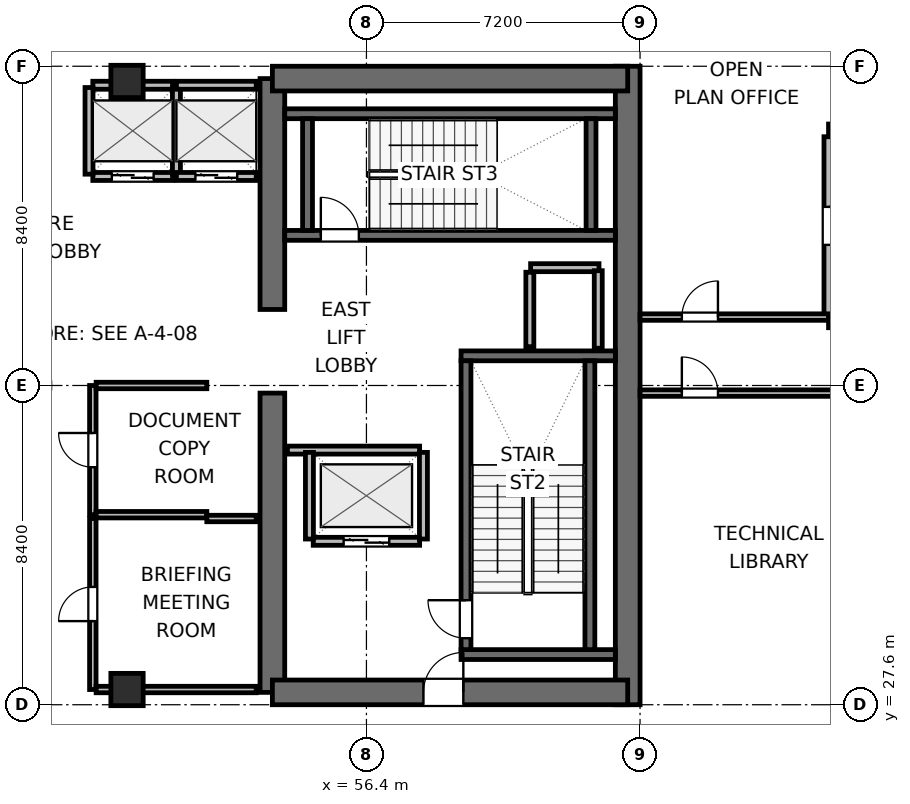
"""IFC4 building model, lengths in metres.
Left out: names, types, materials, properties, quantities, classifications, styles, units other than length and angle.
Written with IfcOpenShell. Run it as: python <this file> out.ifc"""

import sys

from ifc_helpers import new_model, si_unit, direction, frame, frame_2d, origin, origin_2d, place, context, subcontext, project, spatial, rectangle, extrude, element, fill, save


model = new_model("IFC4")
c1 = context("Model", 3, precision=1e-05, world=origin(), true_north=direction((0.0, 1.0)))
c2 = subcontext(c1, "Body", "Model", "MODEL_VIEW")
j1 = project(units=[si_unit("LENGTHUNIT", "METRE"), si_unit("PLANEANGLEUNIT", "RADIAN")], contexts=[c1])
p1 = place(None, origin())
s1 = spatial("IfcSite", under=j1, at=p1, CompositionType="ELEMENT")
p2 = place(p1, origin())
s2 = spatial("IfcBuilding", under=s1, at=p2, CompositionType="ELEMENT")
p3 = place(p2, frame((0.0, 0.0, 181.8)))
s3 = spatial("IfcBuildingStorey", under=s2, at=p3, CompositionType="ELEMENT", Elevation=181.8)
p4 = place(p3, frame((53.925, 27.925, 0.0), z_axis=(0.0, 0.0, 1.0), x_axis=(0.0, 1.0, 0.0)))
e1 = element("IfcWall", 1, at=p4, inside=s3, PredefinedType="SHEAR", context=c2, shape_type="SweptSolid", body=[
    extrude(rectangle(XDim=7.875, YDim=0.65, at=frame_2d((3.938, 0.0))), origin(), (0.0, 0.0, 1.0), 4.5),
])
p5 = place(p3, frame((53.925, 38.0, 0.0), z_axis=(0.0, 0.0, 1.0), x_axis=(0.0, 1.0, 0.0)))
e2 = element("IfcWall", 2, at=p5, inside=s3, PredefinedType="SHEAR", context=c2, shape_type="SweptSolid", body=[
    extrude(rectangle(XDim=6.075, YDim=0.65, at=frame_2d((3.038, 0.0))), origin(), (0.0, 0.0, 1.0), 4.5),
])
p6 = place(p3, frame((63.275, 27.6, 0.0), z_axis=(0.0, 0.0, 1.0), x_axis=(0.0, 1.0, 0.0)))
e3 = element("IfcWall", 3, at=p6, inside=s3, PredefinedType="SHEAR", context=c2, shape_type="SweptSolid", body=[
    extrude(rectangle(XDim=16.8, YDim=0.65, at=frame_2d((8.4, 0.0))), origin(), (0.0, 0.0, 1.0), 4.5),
])
p7 = place(p3, frame((53.925, 27.925, 0.0), z_axis=(0.0, 0.0, 1.0), x_axis=(1.0, 0.0, 0.0)))
e4 = element("IfcWall", 4, at=p7, inside=s3, PredefinedType="SHEAR", context=c2, shape_type="SweptSolid", body=[
    extrude(rectangle(XDim=9.35, YDim=0.65, at=frame_2d((4.675, 0.0))), origin(), (0.0, 0.0, 1.0), 4.5),
])
p8 = place(p7, frame((3.975, 0.0, 0.0)))
e5 = element("IfcOpeningElement", 5, at=p8, cuts=e4, PredefinedType="OPENING", context=c2, shape_type="SweptSolid", body=[
    extrude(rectangle(XDim=1.05, YDim=2.04, at=frame_2d((0.525, 1.02))), frame((0.0, 0.335, 0.0), z_axis=(0.0, -1.0, 0.0), x_axis=(1.0, 0.0, 0.0)), (0.0, 0.0, 1.0), 0.67),
])
p9 = place(p3, frame((53.925, 44.075, 0.0), z_axis=(0.0, 0.0, 1.0), x_axis=(1.0, 0.0, 0.0)))
e6 = element("IfcWall", 6, at=p9, inside=s3, PredefinedType="SHEAR", context=c2, shape_type="SweptSolid", body=[
    extrude(rectangle(XDim=9.35, YDim=0.65, at=frame_2d((4.675, 0.0))), origin(), (0.0, 0.0, 1.0), 4.5),
])
for number, where, z_axis, x_axis in (
    (7, (58.89, 28.92, 0.0), (0.0, 0.0, 1.0), (1.0, 0.0, 0.0)),
    (8, (58.89, 36.78, 0.0), (0.0, 0.0, 1.0), (1.0, 0.0, 0.0)),
):
    element("IfcWall", number, at=place(p3, frame(where, z_axis=z_axis, x_axis=x_axis)), inside=s3, PredefinedType="SHEAR", context=c2, shape_type="SweptSolid", body=[
        extrude(rectangle(XDim=4.06, YDim=0.26, at=frame_2d((2.03, 0.0))), origin(), (0.0, 0.0, 1.0), 4.5),
    ])
p10 = place(p3, frame((59.02, 29.05, 0.0), z_axis=(0.0, 0.0, 1.0), x_axis=(0.0, 1.0, 0.0)))
e9 = element("IfcWall", 9, at=p10, inside=s3, PredefinedType="SHEAR", context=c2, shape_type="SweptSolid", body=[
    extrude(rectangle(XDim=7.6, YDim=0.26, at=frame_2d((3.8, 0.0))), origin(), (0.0, 0.0, 1.0), 4.5),
])
p11 = place(p10, frame((0.3, 0.0, 0.0)))
e10 = element("IfcOpeningElement", 10, at=p11, cuts=e9, PredefinedType="OPENING", context=c2, shape_type="SweptSolid", body=[
    extrude(rectangle(XDim=1.0, YDim=2.04, at=frame_2d((0.5, 1.02))), frame((0.0, 0.14, 0.0), z_axis=(0.0, -1.0, 0.0), x_axis=(1.0, 0.0, 0.0)), (0.0, 0.0, 1.0), 0.28),
])
p12 = place(p3, frame((62.28, 29.05, 0.0), z_axis=(0.0, 0.0, 1.0), x_axis=(0.0, 1.0, 0.0)))
e11 = element("IfcWall", 11, at=p12, inside=s3, PredefinedType="SHEAR", context=c2, shape_type="SweptSolid", body=[
    extrude(rectangle(XDim=7.6, YDim=0.26, at=frame_2d((3.8, 0.0))), origin(), (0.0, 0.0, 1.0), 4.5),
])
p13 = place(p3, frame((54.25, 39.95, 0.0), z_axis=(0.0, 0.0, 1.0), x_axis=(1.0, 0.0, 0.0)))
e12 = element("IfcWall", 12, at=p13, inside=s3, PredefinedType="SHEAR", context=c2, shape_type="SweptSolid", body=[
    extrude(rectangle(XDim=8.7, YDim=0.26, at=frame_2d((4.35, 0.0))), origin(), (0.0, 0.0, 1.0), 4.5),
])
p14 = place(p13, frame((0.95, 0.0, 0.0)))
e13 = element("IfcOpeningElement", 13, at=p14, cuts=e12, PredefinedType="OPENING", context=c2, shape_type="SweptSolid", body=[
    extrude(rectangle(XDim=1.0, YDim=2.04, at=frame_2d((0.5, 1.02))), frame((0.0, 0.14, 0.0), z_axis=(0.0, -1.0, 0.0), x_axis=(1.0, 0.0, 0.0)), (0.0, 0.0, 1.0), 0.28),
])
p15 = place(p3, frame((54.25, 43.15, 0.0), z_axis=(0.0, 0.0, 1.0), x_axis=(1.0, 0.0, 0.0)))
e14 = element("IfcWall", 14, at=p15, inside=s3, PredefinedType="SHEAR", context=c2, shape_type="SweptSolid", body=[
    extrude(rectangle(XDim=8.7, YDim=0.26, at=frame_2d((4.35, 0.0))), origin(), (0.0, 0.0, 1.0), 4.5),
])
for number, where, z_axis, x_axis in (
    (15, (54.85, 40.08, 0.0), (0.0, 0.0, 1.0), (0.0, 1.0, 0.0)),
    (16, (62.31, 40.08, 0.0), (0.0, 0.0, 1.0), (0.0, 1.0, 0.0)),
):
    element("IfcWall", number, at=place(p3, frame(where, z_axis=z_axis, x_axis=x_axis)), inside=s3, PredefinedType="SHEAR", context=c2, shape_type="SweptSolid", body=[
        extrude(rectangle(XDim=2.94, YDim=0.26, at=frame_2d((1.47, 0.0))), origin(), (0.0, 0.0, 1.0), 4.5),
    ])
for number, where, z_axis, x_axis in (
    (17, (50.1, 28.0, 0.0), (0.0, 0.0, 1.0), (1.0, 0.0, 0.0)),
    (18, (50.1, 44.0, 0.0), (0.0, 0.0, 1.0), (1.0, 0.0, 0.0)),
):
    element("IfcColumn", number, at=place(p3, frame(where, z_axis=z_axis, x_axis=x_axis)), inside=s3, PredefinedType="COLUMN", context=c2, shape_type="SweptSolid", body=[
        extrude(rectangle(XDim=0.85, YDim=0.85, at=origin_2d()), origin(), (0.0, 0.0, 1.0), 4.5),
    ])
p16 = place(p3, frame((70.66, 42.74, 0.0), z_axis=(0.0, 0.0, 1.0), x_axis=(-1.0, 0.0, 0.0)))
e19 = element("IfcWall", 19, at=p16, inside=s3, PredefinedType="SOLIDWALL", context=c2, shape_type="SweptSolid", body=[
    extrude(rectangle(XDim=2.1, YDim=0.28, at=frame_2d((1.05, 0.0))), origin(), (0.0, 0.0, 1.0), 3.716),
])
p17 = place(p3, frame((68.56, 42.545, 0.0), z_axis=(0.0, 0.0, 1.0), x_axis=(0.0, -1.0, 0.0)))
e20 = element("IfcWall", 20, at=p17, inside=s3, PredefinedType="SOLIDWALL", context=c2, shape_type="SweptSolid", body=[
    extrude(rectangle(XDim=4.69, YDim=0.24, at=frame_2d((2.345, 0.0))), origin(), (0.0, 0.0, 1.0), 3.848),
])
p18 = place(p17, frame((1.845, 0.0, 0.0)))
e21 = element("IfcOpeningElement", 21, at=p18, cuts=e20, PredefinedType="OPENING", context=c2, shape_type="SweptSolid", body=[
    extrude(rectangle(XDim=1.0, YDim=2.02, at=frame_2d((0.5, 1.01))), frame((0.0, 0.13, 0.0), z_axis=(0.0, -1.0, 0.0), x_axis=(1.0, 0.0, 0.0)), (0.0, 0.0, 1.0), 0.26),
])
p19 = place(p3, frame((68.56, 37.66, 0.0), z_axis=(0.0, 0.0, 1.0), x_axis=(1.0, 0.0, 0.0)))
e22 = element("IfcWall", 22, at=p19, inside=s3, PredefinedType="SOLIDWALL", context=c2, shape_type="SweptSolid", body=[
    extrude(rectangle(XDim=2.1, YDim=0.28, at=frame_2d((1.05, 0.0))), origin(), (0.0, 0.0, 1.0), 3.716),
])
p20 = place(p3, frame((60.72, 39.1, 0.0), z_axis=(0.0, 0.0, 1.0), x_axis=(1.0, 0.0, 0.0)))
e23 = element("IfcWall", 23, at=p20, inside=s3, PredefinedType="PARTITIONING", context=c2, shape_type="SweptSolid", body=[
    extrude(rectangle(XDim=1.8, YDim=0.21, at=frame_2d((0.9, 0.0))), origin(), (0.0, 0.0, 1.0), 4.28),
])
p21 = place(p3, frame((60.7, 37.02, 0.0), z_axis=(0.0, 0.0, 1.0), x_axis=(0.0, 1.0, 0.0)))
e24 = element("IfcWall", 24, at=p21, inside=s3, PredefinedType="PARTITIONING", context=c2, shape_type="SweptSolid", body=[
    extrude(rectangle(XDim=1.96, YDim=0.21, at=frame_2d((0.98, 0.0))), origin(), (0.0, 0.0, 1.0), 4.28),
])
p22 = place(p3, frame((62.5, 36.98, 0.0), z_axis=(0.0, 0.0, 1.0), x_axis=(0.0, 1.0, 0.0)))
e25 = element("IfcWall", 25, at=p22, inside=s3, PredefinedType="PARTITIONING", context=c2, shape_type="SweptSolid", body=[
    extrude(rectangle(XDim=2.04, YDim=0.21, at=frame_2d((1.02, 0.0))), origin(), (0.0, 0.0, 1.0), 4.28),
])
p23 = place(p3, frame((55.0, 31.9, 0.0), z_axis=(0.0, 0.0, 1.0), x_axis=(1.0, 0.0, 0.0)))
e26 = element("IfcWall", 26, at=p23, inside=s3, PredefinedType="PARTITIONING", context=c2, shape_type="SweptSolid", body=[
    extrude(rectangle(XDim=2.8, YDim=0.21, at=frame_2d((1.4, 0.0))), origin(), (0.0, 0.0, 1.0), 4.28),
])
p24 = place(p23, frame((0.8, 0.0, 0.0)))
e27 = element("IfcOpeningElement", 27, at=p24, cuts=e26, PredefinedType="OPENING", context=c2, shape_type="SweptSolid", body=[
    extrude(rectangle(XDim=1.2, YDim=2.04, at=frame_2d((0.6, 1.02))), frame((0.0, 0.115, 0.0), z_axis=(0.0, -1.0, 0.0), x_axis=(1.0, 0.0, 0.0)), (0.0, 0.0, 1.0), 0.23),
])
p25 = place(p3, frame((54.32, 34.3, 0.0), z_axis=(0.0, 0.0, 1.0), x_axis=(1.0, 0.0, 0.0)))
e28 = element("IfcWall", 28, at=p25, inside=s3, PredefinedType="PARTITIONING", context=c2, shape_type="SweptSolid", body=[
    extrude(rectangle(XDim=3.48, YDim=0.21, at=frame_2d((1.74, 0.0))), origin(), (0.0, 0.0, 1.0), 4.28),
])
for number, where, z_axis, x_axis in (
    (29, (54.9, 31.96, 0.0), (0.0, 0.0, 1.0), (0.0, 1.0, 0.0)),
    (30, (57.9, 31.96, 0.0), (0.0, 0.0, 1.0), (0.0, 1.0, 0.0)),
):
    element("IfcWall", number, at=place(p3, frame(where, z_axis=z_axis, x_axis=x_axis)), inside=s3, PredefinedType="PARTITIONING", context=c2, shape_type="SweptSolid", body=[
        extrude(rectangle(XDim=2.28, YDim=0.21, at=frame_2d((1.14, 0.0))), origin(), (0.0, 0.0, 1.0), 4.28),
    ])
p26 = place(p3, frame((49.2, 41.5, 0.0), z_axis=(0.0, 0.0, 1.0), x_axis=(1.0, 0.0, 0.0)))
e31 = element("IfcWall", 31, at=p26, inside=s3, PredefinedType="PARTITIONING", context=c2, shape_type="SweptSolid", body=[
    extrude(rectangle(XDim=2.1, YDim=0.21, at=frame_2d((1.05, 0.0))), origin(), (0.0, 0.0, 1.0), 4.28),
])
p27 = place(p26, frame((0.5, 0.0, 0.0)))
e32 = element("IfcOpeningElement", 32, at=p27, cuts=e31, PredefinedType="OPENING", context=c2, shape_type="SweptSolid", body=[
    extrude(rectangle(XDim=1.1, YDim=2.04, at=frame_2d((0.55, 1.02))), frame((0.0, 0.115, 0.0), z_axis=(0.0, -1.0, 0.0), x_axis=(1.0, 0.0, 0.0)), (0.0, 0.0, 1.0), 0.23),
])
p28 = place(p3, frame((49.2, 43.9, 0.0), z_axis=(0.0, 0.0, 1.0), x_axis=(1.0, 0.0, 0.0)))
e33 = element("IfcWall", 33, at=p28, inside=s3, PredefinedType="PARTITIONING", context=c2, shape_type="SweptSolid", body=[
    extrude(rectangle(XDim=2.1, YDim=0.21, at=frame_2d((1.05, 0.0))), origin(), (0.0, 0.0, 1.0), 3.365),
])
for number, where, z_axis, x_axis in (
    (34, (49.1, 41.56, 0.0), (0.0, 0.0, 1.0), (0.0, 1.0, 0.0)),
    (35, (51.4, 41.56, 0.0), (0.0, 0.0, 1.0), (0.0, 1.0, 0.0)),
):
    element("IfcWall", number, at=place(p3, frame(where, z_axis=z_axis, x_axis=x_axis)), inside=s3, PredefinedType="PARTITIONING", context=c2, shape_type="SweptSolid", body=[
        extrude(rectangle(XDim=2.28, YDim=0.21, at=frame_2d((1.14, 0.0))), origin(), (0.0, 0.0, 1.0), 4.28),
    ])
p29 = place(p3, frame((51.4, 41.5, 0.0), z_axis=(0.0, 0.0, 1.0), x_axis=(1.0, 0.0, 0.0)))
e36 = element("IfcWall", 36, at=p29, inside=s3, PredefinedType="PARTITIONING", context=c2, shape_type="SweptSolid", body=[
    extrude(rectangle(XDim=2.1, YDim=0.21, at=frame_2d((1.05, 0.0))), origin(), (0.0, 0.0, 1.0), 4.28),
])
p30 = place(p29, frame((0.5, 0.0, 0.0)))
e37 = element("IfcOpeningElement", 37, at=p30, cuts=e36, PredefinedType="OPENING", context=c2, shape_type="SweptSolid", body=[
    extrude(rectangle(XDim=1.1, YDim=2.04, at=frame_2d((0.55, 1.02))), frame((0.0, 0.115, 0.0), z_axis=(0.0, -1.0, 0.0), x_axis=(1.0, 0.0, 0.0)), (0.0, 0.0, 1.0), 0.23),
])
p31 = place(p3, frame((51.4, 43.9, 0.0), z_axis=(0.0, 0.0, 1.0), x_axis=(1.0, 0.0, 0.0)))
e38 = element("IfcWall", 38, at=p31, inside=s3, PredefinedType="PARTITIONING", context=c2, shape_type="SweptSolid", body=[
    extrude(rectangle(XDim=2.1, YDim=0.21, at=frame_2d((1.05, 0.0))), origin(), (0.0, 0.0, 1.0), 3.365),
])
p32 = place(p3, frame((49.2, 32.6, 0.0), z_axis=(0.0, 0.0, 1.0), x_axis=(0.0, 1.0, 0.0)))
e39 = element("IfcWall", 39, at=p32, inside=s3, PredefinedType="PARTITIONING", context=c2, shape_type="SweptSolid", body=[
    extrude(rectangle(XDim=3.4, YDim=0.17, at=frame_2d((1.7, 0.0))), origin(), (0.0, 0.0, 1.0), 4.28),
])
p33 = place(p32, frame((1.25, 0.0, 0.0)))
e40 = element("IfcOpeningElement", 40, at=p33, cuts=e39, PredefinedType="OPENING", context=c2, shape_type="SweptSolid", body=[
    extrude(rectangle(XDim=0.9, YDim=2.02, at=frame_2d((0.45, 1.01))), frame((0.0, 0.095, 0.0), z_axis=(0.0, -1.0, 0.0), x_axis=(1.0, 0.0, 0.0)), (0.0, 0.0, 1.0), 0.19),
])
for number, where, z_axis, x_axis in (
    (41, (49.287, 32.6, 0.0), (0.0, 0.0, 1.0), (1.0, 0.0, 0.0)),
    (42, (49.287, 36.0, 0.0), (0.0, 0.0, 1.0), (1.0, 0.0, 0.0)),
):
    element("IfcWall", number, at=place(p3, frame(where, z_axis=z_axis, x_axis=x_axis)), inside=s3, PredefinedType="PARTITIONING", context=c2, shape_type="SweptSolid", body=[
        extrude(rectangle(XDim=2.913, YDim=0.17, at=frame_2d((1.457, 0.0))), origin(), (0.0, 0.0, 1.0), 4.28),
    ])
p34 = place(p3, frame((49.2, 28.0, 0.0), z_axis=(0.0, 0.0, 1.0), x_axis=(0.0, 1.0, 0.0)))
e43 = element("IfcWall", 43, at=p34, inside=s3, PredefinedType="PARTITIONING", context=c2, shape_type="SweptSolid", body=[
    extrude(rectangle(XDim=4.5, YDim=0.17, at=frame_2d((2.25, 0.0))), origin(), (0.0, 0.0, 1.0), 4.28),
])
p35 = place(p34, frame((1.8, 0.0, 0.0)))
e44 = element("IfcOpeningElement", 44, at=p35, cuts=e43, PredefinedType="OPENING", context=c2, shape_type="SweptSolid", body=[
    extrude(rectangle(XDim=0.9, YDim=2.02, at=frame_2d((0.45, 1.01))), frame((0.0, 0.095, 0.0), z_axis=(0.0, -1.0, 0.0), x_axis=(1.0, 0.0, 0.0)), (0.0, 0.0, 1.0), 0.19),
])
p36 = place(p3, frame((49.287, 28.0, 0.0), z_axis=(0.0, 0.0, 1.0), x_axis=(1.0, 0.0, 0.0)))
e45 = element("IfcWall", 45, at=p36, inside=s3, PredefinedType="PARTITIONING", context=c2, shape_type="SweptSolid", body=[
    extrude(rectangle(XDim=4.213, YDim=0.17, at=frame_2d((2.106, 0.0))), origin(), (0.0, 0.0, 1.0), 3.365),
])
p37 = place(p3, frame((52.2, 32.5, 0.0), z_axis=(0.0, 0.0, 1.0), x_axis=(1.0, 0.0, 0.0)))
e46 = element("IfcWall", 46, at=p37, inside=s3, PredefinedType="PARTITIONING", context=c2, shape_type="SweptSolid", body=[
    extrude(rectangle(XDim=1.3, YDim=0.17, at=frame_2d((0.65, 0.0))), origin(), (0.0, 0.0, 1.0), 4.28),
])
p38 = place(p3, frame((63.6, 35.8, 0.0), z_axis=(0.0, 0.0, 1.0), x_axis=(1.0, 0.0, 0.0)))
e47 = element("IfcWall", 47, at=p38, inside=s3, PredefinedType="PARTITIONING", context=c2, shape_type="SweptSolid", body=[
    extrude(rectangle(XDim=6.955, YDim=0.17, at=frame_2d((3.478, 0.0))), origin(), (0.0, 0.0, 1.0), 3.643),
])
p39 = place(p38, frame((1.1, 0.0, 0.0)))
e48 = element("IfcOpeningElement", 48, at=p39, cuts=e47, PredefinedType="OPENING", context=c2, shape_type="SweptSolid", body=[
    extrude(rectangle(XDim=0.95, YDim=2.04, at=frame_2d((0.475, 1.02))), frame((0.0, 0.095, 0.0), z_axis=(0.0, -1.0, 0.0), x_axis=(1.0, 0.0, 0.0)), (0.0, 0.0, 1.0), 0.19),
])
p40 = place(p3, frame((63.6, 37.8, 0.0), z_axis=(0.0, 0.0, 1.0), x_axis=(1.0, 0.0, 0.0)))
e49 = element("IfcWall", 49, at=p40, inside=s3, PredefinedType="PARTITIONING", context=c2, shape_type="SweptSolid", body=[
    extrude(rectangle(XDim=4.96, YDim=0.17, at=frame_2d((2.48, 0.0))), origin(), (0.0, 0.0, 1.0), 4.28),
])
p41 = place(p40, frame((1.1, 0.0, 0.0)))
e50 = element("IfcOpeningElement", 50, at=p41, cuts=e49, PredefinedType="OPENING", context=c2, shape_type="SweptSolid", body=[
    extrude(rectangle(XDim=0.95, YDim=2.04, at=frame_2d((0.475, 1.02))), frame((0.0, 0.095, 0.0), z_axis=(0.0, -1.0, 0.0), x_axis=(1.0, 0.0, 0.0)), (0.0, 0.0, 1.0), 0.19),
])
p42 = place(p18, origin())
e51 = element("IfcDoor", 51, at=p42, inside=s3, OperationType="SINGLE_SWING_LEFT", PredefinedType="DOOR", context=c2, shape_type="SweptSolid", body=[
    extrude(rectangle(XDim=1.0, YDim=2.02, at=frame_2d((0.5, 1.01))), frame((0.0, 0.025, 0.0), z_axis=(0.0, -1.0, 0.0), x_axis=(1.0, 0.0, 0.0)), (0.0, 0.0, 1.0), 0.05),
])
fill(e21, e51)
p43 = place(p11, origin())
e52 = element("IfcDoor", 52, at=p43, inside=s3, OperationType="SINGLE_SWING_RIGHT", PredefinedType="DOOR", context=c2, shape_type="SweptSolid", body=[
    extrude(rectangle(XDim=1.0, YDim=2.04, at=frame_2d((0.5, 1.02))), frame((0.0, 0.025, 0.0), z_axis=(0.0, -1.0, 0.0), x_axis=(1.0, 0.0, 0.0)), (0.0, 0.0, 1.0), 0.05),
])
fill(e10, e52)
p44 = place(p14, origin())
e53 = element("IfcDoor", 53, at=p44, inside=s3, OperationType="SINGLE_SWING_LEFT", PredefinedType="DOOR", context=c2, shape_type="SweptSolid", body=[
    extrude(rectangle(XDim=1.0, YDim=2.04, at=frame_2d((0.5, 1.02))), frame((0.0, 0.025, 0.0), z_axis=(0.0, -1.0, 0.0), x_axis=(1.0, 0.0, 0.0)), (0.0, 0.0, 1.0), 0.05),
])
fill(e13, e53)
p45 = place(p24, origin())
e54 = element("IfcDoor", 54, at=p45, inside=s3, OperationType="DOUBLE_DOOR_SLIDING", PredefinedType="DOOR", context=c2, shape_type="SweptSolid", body=[
    extrude(rectangle(XDim=1.2, YDim=2.04, at=frame_2d((0.6, 1.02))), frame((0.0, 0.025, 0.0), z_axis=(0.0, -1.0, 0.0), x_axis=(1.0, 0.0, 0.0)), (0.0, 0.0, 1.0), 0.05),
])
fill(e27, e54)
p46 = place(p27, origin())
e55 = element("IfcDoor", 55, at=p46, inside=s3, OperationType="DOUBLE_DOOR_SLIDING", PredefinedType="DOOR", context=c2, shape_type="SweptSolid", body=[
    extrude(rectangle(XDim=1.1, YDim=2.04, at=frame_2d((0.55, 1.02))), frame((0.0, 0.025, 0.0), z_axis=(0.0, -1.0, 0.0), x_axis=(1.0, 0.0, 0.0)), (0.0, 0.0, 1.0), 0.05),
])
fill(e32, e55)
p47 = place(p30, origin())
e56 = element("IfcDoor", 56, at=p47, inside=s3, OperationType="DOUBLE_DOOR_SLIDING", PredefinedType="DOOR", context=c2, shape_type="SweptSolid", body=[
    extrude(rectangle(XDim=1.1, YDim=2.04, at=frame_2d((0.55, 1.02))), frame((0.0, 0.025, 0.0), z_axis=(0.0, -1.0, 0.0), x_axis=(1.0, 0.0, 0.0)), (0.0, 0.0, 1.0), 0.05),
])
fill(e37, e56)
p48 = place(p8, origin())
e57 = element("IfcDoor", 57, at=p48, inside=s3, OperationType="SINGLE_SWING_RIGHT", PredefinedType="DOOR", context=c2, shape_type="SweptSolid", body=[
    extrude(rectangle(XDim=1.05, YDim=2.04, at=frame_2d((0.525, 1.02))), frame((0.0, 0.025, 0.0), z_axis=(0.0, -1.0, 0.0), x_axis=(1.0, 0.0, 0.0)), (0.0, 0.0, 1.0), 0.05),
])
fill(e5, e57)
p49 = place(p33, origin())
e58 = element("IfcDoor", 58, at=p49, inside=s3, OperationType="SINGLE_SWING_RIGHT", PredefinedType="DOOR", context=c2, shape_type="SweptSolid", body=[
    extrude(rectangle(XDim=0.9, YDim=2.02, at=frame_2d((0.45, 1.01))), frame((0.0, 0.025, 0.0), z_axis=(0.0, -1.0, 0.0), x_axis=(1.0, 0.0, 0.0)), (0.0, 0.0, 1.0), 0.05),
])
fill(e40, e58)
p50 = place(p35, origin())
e59 = element("IfcDoor", 59, at=p50, inside=s3, OperationType="SINGLE_SWING_LEFT", PredefinedType="DOOR", context=c2, shape_type="SweptSolid", body=[
    extrude(rectangle(XDim=0.9, YDim=2.02, at=frame_2d((0.45, 1.01))), frame((0.0, 0.025, 0.0), z_axis=(0.0, -1.0, 0.0), x_axis=(1.0, 0.0, 0.0)), (0.0, 0.0, 1.0), 0.05),
])
fill(e44, e59)
p51 = place(p39, origin())
e60 = element("IfcDoor", 60, at=p51, inside=s3, OperationType="SINGLE_SWING_LEFT", PredefinedType="DOOR", context=c2, shape_type="SweptSolid", body=[
    extrude(rectangle(XDim=0.95, YDim=2.04, at=frame_2d((0.475, 1.02))), frame((0.0, 0.025, 0.0), z_axis=(0.0, -1.0, 0.0), x_axis=(1.0, 0.0, 0.0)), (0.0, 0.0, 1.0), 0.05),
])
fill(e48, e60)
p52 = place(p41, origin())
e61 = element("IfcDoor", 61, at=p52, inside=s3, OperationType="SINGLE_SWING_RIGHT", PredefinedType="DOOR", context=c2, shape_type="SweptSolid", body=[
    extrude(rectangle(XDim=0.95, YDim=2.04, at=frame_2d((0.475, 1.02))), frame((0.0, 0.025, 0.0), z_axis=(0.0, -1.0, 0.0), x_axis=(1.0, 0.0, 0.0)), (0.0, 0.0, 1.0), 0.05),
])
fill(e50, e61)
save(model, sys.argv[1])
